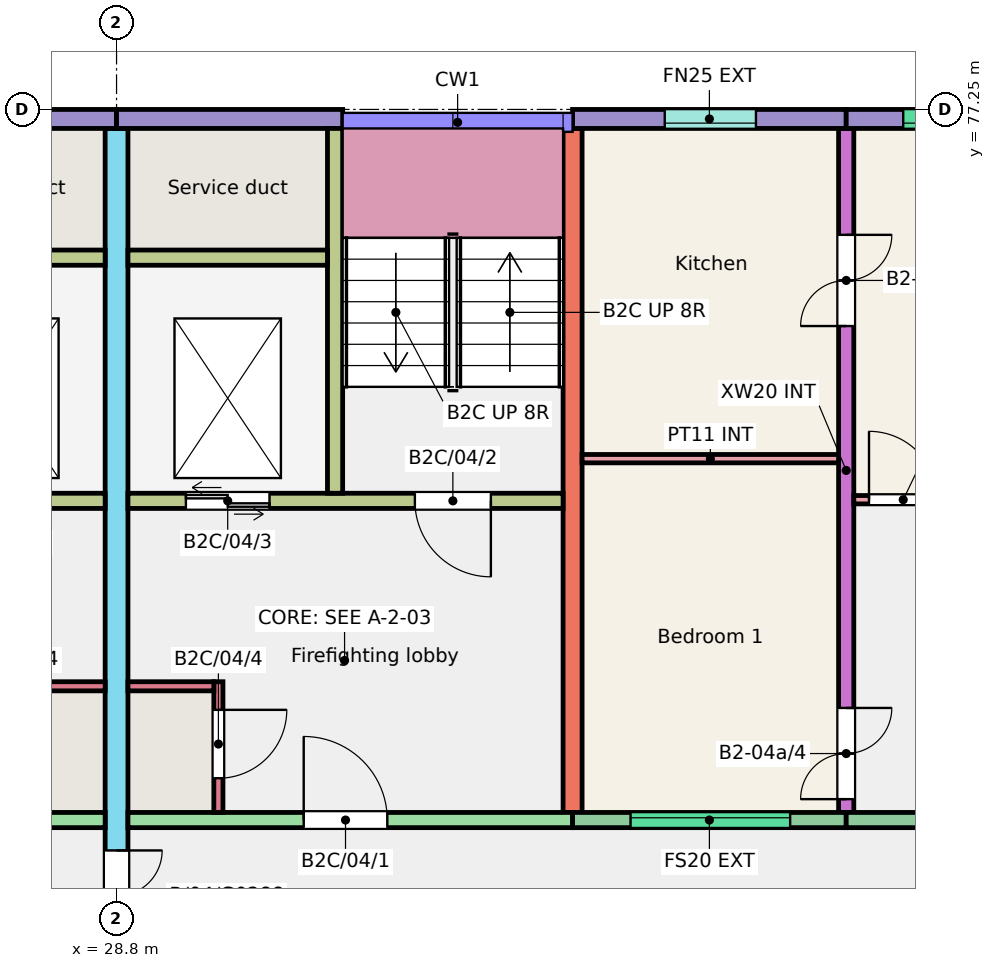
"""IFC4 building model, lengths in metres.
Left out: names, types, materials, properties, quantities, classifications, styles, units other than length and angle.
Written with IfcOpenShell. Run it as: python <this file> out.ifc"""

import sys

from ifc_helpers import new_model, si_unit, direction, frame, frame_2d, origin, place, context, subcontext, project, spatial, rectangle, extrude, element, fill, save


model = new_model("IFC4")
c1 = context("Model", 3, precision=1e-05, world=origin(), true_north=direction((0.0, 1.0)))
c2 = subcontext(c1, "Body", "Model", "MODEL_VIEW")
j1 = project(units=[si_unit("LENGTHUNIT", "METRE"), si_unit("PLANEANGLEUNIT", "RADIAN")], contexts=[c1])
p1 = place(None, origin())
s1 = spatial("IfcSite", under=j1, at=p1, CompositionType="ELEMENT")
p2 = place(p1, origin())
s2 = spatial("IfcBuilding", under=s1, at=p2, CompositionType="ELEMENT")
p3 = place(p2, frame((0.0, 0.0, 12.0)))
s3 = spatial("IfcBuildingStorey", under=s2, at=p3, CompositionType="ELEMENT", Elevation=12.0)
p4 = place(p3, frame((28.8, 66.0, 0.0), z_axis=(0.0, 0.0, 1.0), x_axis=(0.0, 1.0, 0.0)))
e1 = element("IfcWall", 1, at=p4, inside=s3, PredefinedType="SHEAR", context=c2, shape_type="SweptSolid", body=[
    extrude(rectangle(XDim=11.0, YDim=0.3, at=frame_2d((5.5, 0.0))), origin(), (0.0, 0.0, 1.0), 3.0),
])
p5 = place(p4, frame((0.3, 0.0, 0.0)))
e2 = element("IfcOpeningElement", 2, at=p5, cuts=e1, PredefinedType="OPENING", context=c2, shape_type="SweptSolid", body=[
    extrude(rectangle(XDim=1.2, YDim=2.1, at=frame_2d((0.6, 1.05))), frame((0.0, 0.16, 0.0), z_axis=(0.0, -1.0, 0.0), x_axis=(1.0, 0.0, 0.0)), (0.0, 0.0, 1.0), 0.32),
])
p6 = place(p3, frame((34.8, 68.0, 0.0), z_axis=(0.0, 0.0, 1.0), x_axis=(0.0, 1.0, 0.0)))
e3 = element("IfcWall", 3, at=p6, inside=s3, PredefinedType="SHEAR", context=c2, shape_type="SweptSolid", body=[
    extrude(rectangle(XDim=9.0, YDim=0.25, at=frame_2d((4.5, 0.0))), origin(), (0.0, 0.0, 1.0), 3.0),
])
p7 = place(p3, frame((38.4, 68.0, 0.0), z_axis=(0.0, 0.0, 1.0), x_axis=(0.0, 1.0, 0.0)))
e4 = element("IfcWall", 4, at=p7, inside=s3, PredefinedType="SHEAR", context=c2, shape_type="SweptSolid", body=[
    extrude(rectangle(XDim=9.0, YDim=0.2, at=frame_2d((4.5, 0.0))), origin(), (0.0, 0.0, 1.0), 3.0),
])
p8 = place(p7, frame((0.175, 0.0, 0.0)))
e5 = element("IfcOpeningElement", 5, at=p8, cuts=e4, PredefinedType="OPENING", context=c2, shape_type="SweptSolid", body=[
    extrude(rectangle(XDim=1.2, YDim=2.1, at=frame_2d((0.6, 1.05))), frame((0.0, 0.11, 0.0), z_axis=(0.0, -1.0, 0.0), x_axis=(1.0, 0.0, 0.0)), (0.0, 0.0, 1.0), 0.22),
])
p9 = place(p7, frame((6.4, 0.0, 0.0)))
e6 = element("IfcOpeningElement", 6, at=p9, cuts=e4, PredefinedType="OPENING", context=c2, shape_type="SweptSolid", body=[
    extrude(rectangle(XDim=1.2, YDim=2.1, at=frame_2d((0.6, 1.05))), frame((0.0, 0.11, 0.0), z_axis=(0.0, -1.0, 0.0), x_axis=(1.0, 0.0, 0.0)), (0.0, 0.0, 1.0), 0.22),
])
p10 = place(p3, frame((25.825, 77.125, 0.0), z_axis=(0.0, 0.0, 1.0), x_axis=(1.0, 0.0, 0.0)))
e7 = element("IfcWall", 7, at=p10, inside=s3, PredefinedType="SOLIDWALL", context=c2, shape_type="SweptSolid", body=[
    extrude(rectangle(XDim=2.975, YDim=0.25, at=frame_2d((1.488, 0.0))), origin(), (0.0, 0.0, 1.0), 3.0),
])
p11 = place(p3, frame((22.8, 67.9, 0.0), z_axis=(0.0, 0.0, 1.0), x_axis=(1.0, 0.0, 0.0)))
e8 = element("IfcWall", 8, at=p11, inside=s3, PredefinedType="SHEAR", context=c2, shape_type="SweptSolid", body=[
    extrude(rectangle(XDim=5.85, YDim=0.2, at=frame_2d((2.925, 0.0))), origin(), (0.0, 0.0, 1.0), 3.0),
])
p12 = place(p11, frame((2.438, 0.0, 0.0)))
e9 = element("IfcOpeningElement", 9, at=p12, cuts=e8, PredefinedType="OPENING", context=c2, shape_type="SweptSolid", body=[
    extrude(rectangle(XDim=1.1, YDim=2.1, at=frame_2d((0.55, 1.05))), frame((0.0, 0.11, 0.0), z_axis=(0.0, -1.0, 0.0), x_axis=(1.0, 0.0, 0.0)), (0.0, 0.0, 1.0), 0.22),
])
p13 = place(p3, frame((22.925, 72.1, 0.0), z_axis=(0.0, 0.0, 1.0), x_axis=(1.0, 0.0, 0.0)))
e10 = element("IfcWall", 10, at=p13, inside=s3, PredefinedType="SHEAR", context=c2, shape_type="SweptSolid", body=[
    extrude(rectangle(XDim=5.725, YDim=0.2, at=frame_2d((2.862, 0.0))), origin(), (0.0, 0.0, 1.0), 3.0),
])
p14 = place(p13, frame((0.95, 0.0, 0.0)))
e11 = element("IfcOpeningElement", 11, at=p14, cuts=e10, PredefinedType="OPENING", context=c2, shape_type="SweptSolid", body=[
    extrude(rectangle(XDim=1.0, YDim=2.1, at=frame_2d((0.5, 1.05))), frame((0.0, 0.11, 0.0), z_axis=(0.0, -1.0, 0.0), x_axis=(1.0, 0.0, 0.0)), (0.0, 0.0, 1.0), 0.22),
])
p15 = place(p13, frame((3.863, 0.0, 0.0)))
e12 = element("IfcOpeningElement", 12, at=p15, cuts=e10, PredefinedType="OPENING", context=c2, shape_type="SweptSolid", body=[
    extrude(rectangle(XDim=1.1, YDim=2.1, at=frame_2d((0.55, 1.05))), frame((0.0, 0.11, 0.0), z_axis=(0.0, -1.0, 0.0), x_axis=(1.0, 0.0, 0.0)), (0.0, 0.0, 1.0), 0.22),
])
p16 = place(p3, frame((26.025, 75.3, 0.0), z_axis=(0.0, 0.0, 1.0), x_axis=(1.0, 0.0, 0.0)))
e13 = element("IfcWall", 13, at=p16, inside=s3, PredefinedType="SHEAR", context=c2, shape_type="SweptSolid", body=[
    extrude(rectangle(XDim=2.625, YDim=0.2, at=frame_2d((1.312, 0.0))), origin(), (0.0, 0.0, 1.0), 3.0),
])
p17 = place(p3, frame((27.52, 69.66, 0.0), z_axis=(0.0, 0.0, 1.0), x_axis=(1.0, 0.0, 0.0)))
e14 = element("IfcWall", 14, at=p17, inside=s3, PredefinedType="SHEAR", context=c2, shape_type="SweptSolid", body=[
    extrude(rectangle(XDim=1.13, YDim=0.12, at=frame_2d((0.565, 0.0))), origin(), (0.0, 0.0, 1.0), 3.0),
])
p18 = place(p3, frame((28.8, 77.125, 0.0), z_axis=(0.0, 0.0, 1.0), x_axis=(1.0, 0.0, 0.0)))
e15 = element("IfcWall", 15, at=p18, inside=s3, PredefinedType="SOLIDWALL", context=c2, shape_type="SweptSolid", body=[
    extrude(rectangle(XDim=2.975, YDim=0.25, at=frame_2d((1.487, 0.0))), origin(), (0.0, 0.0, 1.0), 3.0),
])
p19 = place(p3, frame((28.95, 67.9, 0.0), z_axis=(0.0, 0.0, 1.0), x_axis=(1.0, 0.0, 0.0)))
e16 = element("IfcWall", 16, at=p19, inside=s3, PredefinedType="SHEAR", context=c2, shape_type="SweptSolid", body=[
    extrude(rectangle(XDim=5.85, YDim=0.2, at=frame_2d((2.925, 0.0))), origin(), (0.0, 0.0, 1.0), 3.0),
])
p20 = place(p19, frame((2.312, 0.0, 0.0)))
e17 = element("IfcOpeningElement", 17, at=p20, cuts=e16, PredefinedType="OPENING", context=c2, shape_type="SweptSolid", body=[
    extrude(rectangle(XDim=1.1, YDim=2.1, at=frame_2d((0.55, 1.05))), frame((0.0, 0.11, 0.0), z_axis=(0.0, -1.0, 0.0), x_axis=(1.0, 0.0, 0.0)), (0.0, 0.0, 1.0), 0.22),
])
p21 = place(p3, frame((28.95, 72.1, 0.0), z_axis=(0.0, 0.0, 1.0), x_axis=(1.0, 0.0, 0.0)))
e18 = element("IfcWall", 18, at=p21, inside=s3, PredefinedType="SHEAR", context=c2, shape_type="SweptSolid", body=[
    extrude(rectangle(XDim=5.725, YDim=0.2, at=frame_2d((2.863, 0.0))), origin(), (0.0, 0.0, 1.0), 3.0),
])
p22 = place(p21, frame((3.775, 0.0, 0.0)))
e19 = element("IfcOpeningElement", 19, at=p22, cuts=e18, PredefinedType="OPENING", context=c2, shape_type="SweptSolid", body=[
    extrude(rectangle(XDim=1.0, YDim=2.1, at=frame_2d((0.5, 1.05))), frame((0.0, 0.11, 0.0), z_axis=(0.0, -1.0, 0.0), x_axis=(1.0, 0.0, 0.0)), (0.0, 0.0, 1.0), 0.22),
])
p23 = place(p21, frame((0.762, 0.0, 0.0)))
e20 = element("IfcOpeningElement", 20, at=p23, cuts=e18, PredefinedType="OPENING", context=c2, shape_type="SweptSolid", body=[
    extrude(rectangle(XDim=1.1, YDim=2.1, at=frame_2d((0.55, 1.05))), frame((0.0, 0.11, 0.0), z_axis=(0.0, -1.0, 0.0), x_axis=(1.0, 0.0, 0.0)), (0.0, 0.0, 1.0), 0.22),
])
p24 = place(p3, frame((31.675, 72.2, 0.0), z_axis=(0.0, 0.0, 1.0), x_axis=(0.0, 1.0, 0.0)))
e21 = element("IfcWall", 21, at=p24, inside=s3, PredefinedType="SHEAR", context=c2, shape_type="SweptSolid", body=[
    extrude(rectangle(XDim=4.8, YDim=0.2, at=frame_2d((2.4, 0.0))), origin(), (0.0, 0.0, 1.0), 3.0),
])
p25 = place(p3, frame((28.95, 75.3, 0.0), z_axis=(0.0, 0.0, 1.0), x_axis=(1.0, 0.0, 0.0)))
e22 = element("IfcWall", 22, at=p25, inside=s3, PredefinedType="SHEAR", context=c2, shape_type="SweptSolid", body=[
    extrude(rectangle(XDim=2.625, YDim=0.2, at=frame_2d((1.312, 0.0))), origin(), (0.0, 0.0, 1.0), 3.0),
])
p26 = place(p3, frame((30.14, 68.0, 0.0), z_axis=(0.0, 0.0, 1.0), x_axis=(0.0, 1.0, 0.0)))
e23 = element("IfcWall", 23, at=p26, inside=s3, PredefinedType="SHEAR", context=c2, shape_type="SweptSolid", body=[
    extrude(rectangle(XDim=1.72, YDim=0.12, at=frame_2d((0.86, 0.0))), origin(), (0.0, 0.0, 1.0), 3.0),
])
p27 = place(p26, frame((0.45, 0.0, 0.0)))
e24 = element("IfcOpeningElement", 24, at=p27, cuts=e23, PredefinedType="OPENING", context=c2, shape_type="SweptSolid", body=[
    extrude(rectangle(XDim=0.9, YDim=2.1, at=frame_2d((0.45, 1.05))), frame((0.0, 0.07, 0.0), z_axis=(0.0, -1.0, 0.0), x_axis=(1.0, 0.0, 0.0)), (0.0, 0.0, 1.0), 0.14),
])
p28 = place(p3, frame((28.95, 69.66, 0.0), z_axis=(0.0, 0.0, 1.0), x_axis=(1.0, 0.0, 0.0)))
e25 = element("IfcWall", 25, at=p28, inside=s3, PredefinedType="SHEAR", context=c2, shape_type="SweptSolid", body=[
    extrude(rectangle(XDim=1.13, YDim=0.12, at=frame_2d((0.565, 0.0))), origin(), (0.0, 0.0, 1.0), 3.0),
])
p29 = place(p3, frame((34.8, 77.125, 0.0), z_axis=(0.0, 0.0, 1.0), x_axis=(1.0, 0.0, 0.0)))
e26 = element("IfcWall", 26, at=p29, inside=s3, PredefinedType="SOLIDWALL", context=c2, shape_type="SweptSolid", body=[
    extrude(rectangle(XDim=3.6, YDim=0.25, at=frame_2d((1.8, 0.0))), origin(), (0.0, 0.0, 1.0), 3.0),
])
p30 = place(p29, frame((1.212, 0.0, 1.1)))
e27 = element("IfcOpeningElement", 27, at=p30, cuts=e26, PredefinedType="OPENING", context=c2, shape_type="SweptSolid", body=[
    extrude(rectangle(XDim=1.2, YDim=1.3, at=frame_2d((0.6, 0.65))), frame((0.0, 0.135, 0.0), z_axis=(0.0, -1.0, 0.0), x_axis=(1.0, 0.0, 0.0)), (0.0, 0.0, 1.0), 0.27),
])
p31 = place(p3, frame((34.8, 67.9, 0.0), z_axis=(0.0, 0.0, 1.0), x_axis=(1.0, 0.0, 0.0)))
e28 = element("IfcWall", 28, at=p31, inside=s3, PredefinedType="SOLIDWALL", context=c2, shape_type="SweptSolid", body=[
    extrude(rectangle(XDim=3.6, YDim=0.2, at=frame_2d((1.8, 0.0))), origin(), (0.0, 0.0, 1.0), 3.0),
])
p32 = place(p31, frame((0.762, 0.0, 1.2)))
e29 = element("IfcOpeningElement", 29, at=p32, cuts=e28, PredefinedType="OPENING", context=c2, shape_type="SweptSolid", body=[
    extrude(rectangle(XDim=2.1, YDim=1.2, at=frame_2d((1.05, 0.6))), frame((0.0, 0.11, 0.0), z_axis=(0.0, -1.0, 0.0), x_axis=(1.0, 0.0, 0.0)), (0.0, 0.0, 1.0), 0.22),
])
p33 = place(p3, frame((38.4, 77.125, 0.0), z_axis=(0.0, 0.0, 1.0), x_axis=(1.0, 0.0, 0.0)))
e30 = element("IfcWall", 30, at=p33, inside=s3, PredefinedType="SOLIDWALL", context=c2, shape_type="SweptSolid", body=[
    extrude(rectangle(XDim=3.6, YDim=0.25, at=frame_2d((1.8, 0.0))), origin(), (0.0, 0.0, 1.0), 3.0),
])
p34 = place(p33, frame((0.75, 0.0, 1.2)))
e31 = element("IfcOpeningElement", 31, at=p34, cuts=e30, PredefinedType="OPENING", context=c2, shape_type="SweptSolid", body=[
    extrude(rectangle(XDim=2.1, YDim=1.2, at=frame_2d((1.05, 0.6))), frame((0.0, 0.135, 0.0), z_axis=(0.0, -1.0, 0.0), x_axis=(1.0, 0.0, 0.0)), (0.0, 0.0, 1.0), 0.27),
])
p35 = place(p3, frame((38.4, 67.9, 0.0), z_axis=(0.0, 0.0, 1.0), x_axis=(1.0, 0.0, 0.0)))
e32 = element("IfcWall", 32, at=p35, inside=s3, PredefinedType="SOLIDWALL", context=c2, shape_type="SweptSolid", body=[
    extrude(rectangle(XDim=3.6, YDim=0.2, at=frame_2d((1.8, 0.0))), origin(), (0.0, 0.0, 1.0), 3.0),
])
p36 = place(p35, frame((1.3, 0.0, 0.0)))
e33 = element("IfcOpeningElement", 33, at=p36, cuts=e32, PredefinedType="OPENING", context=c2, shape_type="SweptSolid", body=[
    extrude(rectangle(XDim=1.0, YDim=2.1, at=frame_2d((0.5, 1.05))), frame((0.0, 0.11, 0.0), z_axis=(0.0, -1.0, 0.0), x_axis=(1.0, 0.0, 0.0)), (0.0, 0.0, 1.0), 0.22),
])
p37 = place(p3, frame((38.5, 72.115, 0.0), z_axis=(0.0, 0.0, 1.0), x_axis=(1.0, 0.0, 0.0)))
e34 = element("IfcWall", 34, at=p37, inside=s3, PredefinedType="PARTITIONING", context=c2, shape_type="SweptSolid", body=[
    extrude(rectangle(XDim=3.4, YDim=0.11, at=frame_2d((1.7, 0.0))), origin(), (0.0, 0.0, 1.0), 2.8),
])
p38 = place(p37, frame((0.2, 0.0, 0.0)))
e35 = element("IfcOpeningElement", 35, at=p38, cuts=e34, PredefinedType="OPENING", context=c2, shape_type="SweptSolid", body=[
    extrude(rectangle(XDim=0.9, YDim=2.1, at=frame_2d((0.45, 1.05))), frame((0.0, 0.065, 0.0), z_axis=(0.0, -1.0, 0.0), x_axis=(1.0, 0.0, 0.0)), (0.0, 0.0, 1.0), 0.13),
])
p39 = place(p3, frame((34.925, 72.655, 0.0), z_axis=(0.0, 0.0, 1.0), x_axis=(1.0, 0.0, 0.0)))
e36 = element("IfcWall", 36, at=p39, inside=s3, PredefinedType="PARTITIONING", context=c2, shape_type="SweptSolid", body=[
    extrude(rectangle(XDim=3.375, YDim=0.11, at=frame_2d((1.688, 0.0))), origin(), (0.0, 0.0, 1.0), 2.8),
])
p40 = place(p32, origin())
e37 = element("IfcWindow", 37, at=p40, inside=s3, PartitioningType="SINGLE_PANEL", PredefinedType="WINDOW", context=c2, shape_type="SweptSolid", body=[
    extrude(rectangle(XDim=2.1, YDim=1.2, at=frame_2d((1.05, 0.6))), frame((0.0, 0.06, 0.0), z_axis=(0.0, -1.0, 0.0), x_axis=(1.0, 0.0, 0.0)), (0.0, 0.0, 1.0), 0.06),
])
fill(e29, e37)
p41 = place(p30, origin())
e38 = element("IfcWindow", 38, at=p41, inside=s3, PartitioningType="SINGLE_PANEL", PredefinedType="WINDOW", context=c2, shape_type="SweptSolid", body=[
    extrude(rectangle(XDim=1.2, YDim=1.3, at=frame_2d((0.6, 0.65))), frame((0.0, -0.025, 0.0), z_axis=(0.0, -1.0, 0.0), x_axis=(1.0, 0.0, 0.0)), (0.0, 0.0, 1.0), 0.06),
])
fill(e27, e38)
p42 = place(p34, origin())
e39 = element("IfcWindow", 39, at=p42, inside=s3, PartitioningType="SINGLE_PANEL", PredefinedType="WINDOW", context=c2, shape_type="SweptSolid", body=[
    extrude(rectangle(XDim=2.1, YDim=1.2, at=frame_2d((1.05, 0.6))), frame((0.0, -0.025, 0.0), z_axis=(0.0, -1.0, 0.0), x_axis=(1.0, 0.0, 0.0)), (0.0, 0.0, 1.0), 0.06),
])
fill(e31, e39)
p43 = place(p38, origin())
e40 = element("IfcDoor", 40, at=p43, inside=s3, OperationType="SINGLE_SWING_LEFT", PredefinedType="DOOR", context=c2, shape_type="SweptSolid", body=[
    extrude(rectangle(XDim=0.9, YDim=2.1, at=frame_2d((0.45, 1.05))), frame((0.0, 0.025, 0.0), z_axis=(0.0, -1.0, 0.0), x_axis=(1.0, 0.0, 0.0)), (0.0, 0.0, 1.0), 0.05),
])
fill(e35, e40)
p44 = place(p8, origin())
e41 = element("IfcDoor", 41, at=p44, inside=s3, OperationType="DOUBLE_DOOR_SINGLE_SWING", PredefinedType="DOOR", context=c2, shape_type="SweptSolid", body=[
    extrude(rectangle(XDim=1.2, YDim=2.1, at=frame_2d((0.6, 1.05))), frame((0.0, 0.025, 0.0), z_axis=(0.0, -1.0, 0.0), x_axis=(1.0, 0.0, 0.0)), (0.0, 0.0, 1.0), 0.05),
])
fill(e5, e41)
p45 = place(p9, origin())
e42 = element("IfcDoor", 42, at=p45, inside=s3, OperationType="DOUBLE_DOOR_SINGLE_SWING", PredefinedType="DOOR", context=c2, shape_type="SweptSolid", body=[
    extrude(rectangle(XDim=1.2, YDim=2.1, at=frame_2d((0.6, 1.05))), frame((0.0, 0.025, 0.0), z_axis=(0.0, -1.0, 0.0), x_axis=(1.0, 0.0, 0.0)), (0.0, 0.0, 1.0), 0.05),
])
fill(e6, e42)
p46 = place(p20, origin())
e43 = element("IfcDoor", 43, at=p46, inside=s3, OperationType="SINGLE_SWING_LEFT", PredefinedType="DOOR", context=c2, shape_type="SweptSolid", body=[
    extrude(rectangle(XDim=1.1, YDim=2.1, at=frame_2d((0.55, 1.05))), frame((0.0, 0.025, 0.0), z_axis=(0.0, -1.0, 0.0), x_axis=(1.0, 0.0, 0.0)), (0.0, 0.0, 1.0), 0.05),
])
fill(e17, e43)
p47 = place(p22, origin())
e44 = element("IfcDoor", 44, at=p47, inside=s3, OperationType="SINGLE_SWING_RIGHT", PredefinedType="DOOR", context=c2, shape_type="SweptSolid", body=[
    extrude(rectangle(XDim=1.0, YDim=2.1, at=frame_2d((0.5, 1.05))), frame((0.0, 0.025, 0.0), z_axis=(0.0, -1.0, 0.0), x_axis=(1.0, 0.0, 0.0)), (0.0, 0.0, 1.0), 0.05),
])
fill(e19, e44)
p48 = place(p23, origin())
e45 = element("IfcDoor", 45, at=p48, inside=s3, OperationType="DOUBLE_DOOR_SLIDING", PredefinedType="DOOR", context=c2, shape_type="SweptSolid", body=[
    extrude(rectangle(XDim=1.1, YDim=2.1, at=frame_2d((0.55, 1.05))), frame((0.0, 0.025, 0.0), z_axis=(0.0, -1.0, 0.0), x_axis=(1.0, 0.0, 0.0)), (0.0, 0.0, 1.0), 0.05),
])
fill(e20, e45)
p49 = place(p27, origin())
e46 = element("IfcDoor", 46, at=p49, inside=s3, OperationType="SINGLE_SWING_RIGHT", PredefinedType="DOOR", context=c2, shape_type="SweptSolid", body=[
    extrude(rectangle(XDim=0.9, YDim=2.1, at=frame_2d((0.45, 1.05))), frame((0.0, 0.025, 0.0), z_axis=(0.0, -1.0, 0.0), x_axis=(1.0, 0.0, 0.0)), (0.0, 0.0, 1.0), 0.05),
])
fill(e24, e46)
p50 = place(p5, origin())
e47 = element("IfcDoor", 47, at=p50, inside=s3, OperationType="DOUBLE_DOOR_SINGLE_SWING", PredefinedType="DOOR", context=c2, shape_type="SweptSolid", body=[
    extrude(rectangle(XDim=1.2, YDim=2.1, at=frame_2d((0.6, 1.05))), frame((0.0, 0.025, 0.0), z_axis=(0.0, -1.0, 0.0), x_axis=(1.0, 0.0, 0.0)), (0.0, 0.0, 1.0), 0.05),
])
fill(e2, e47)
save(model, sys.argv[1])
